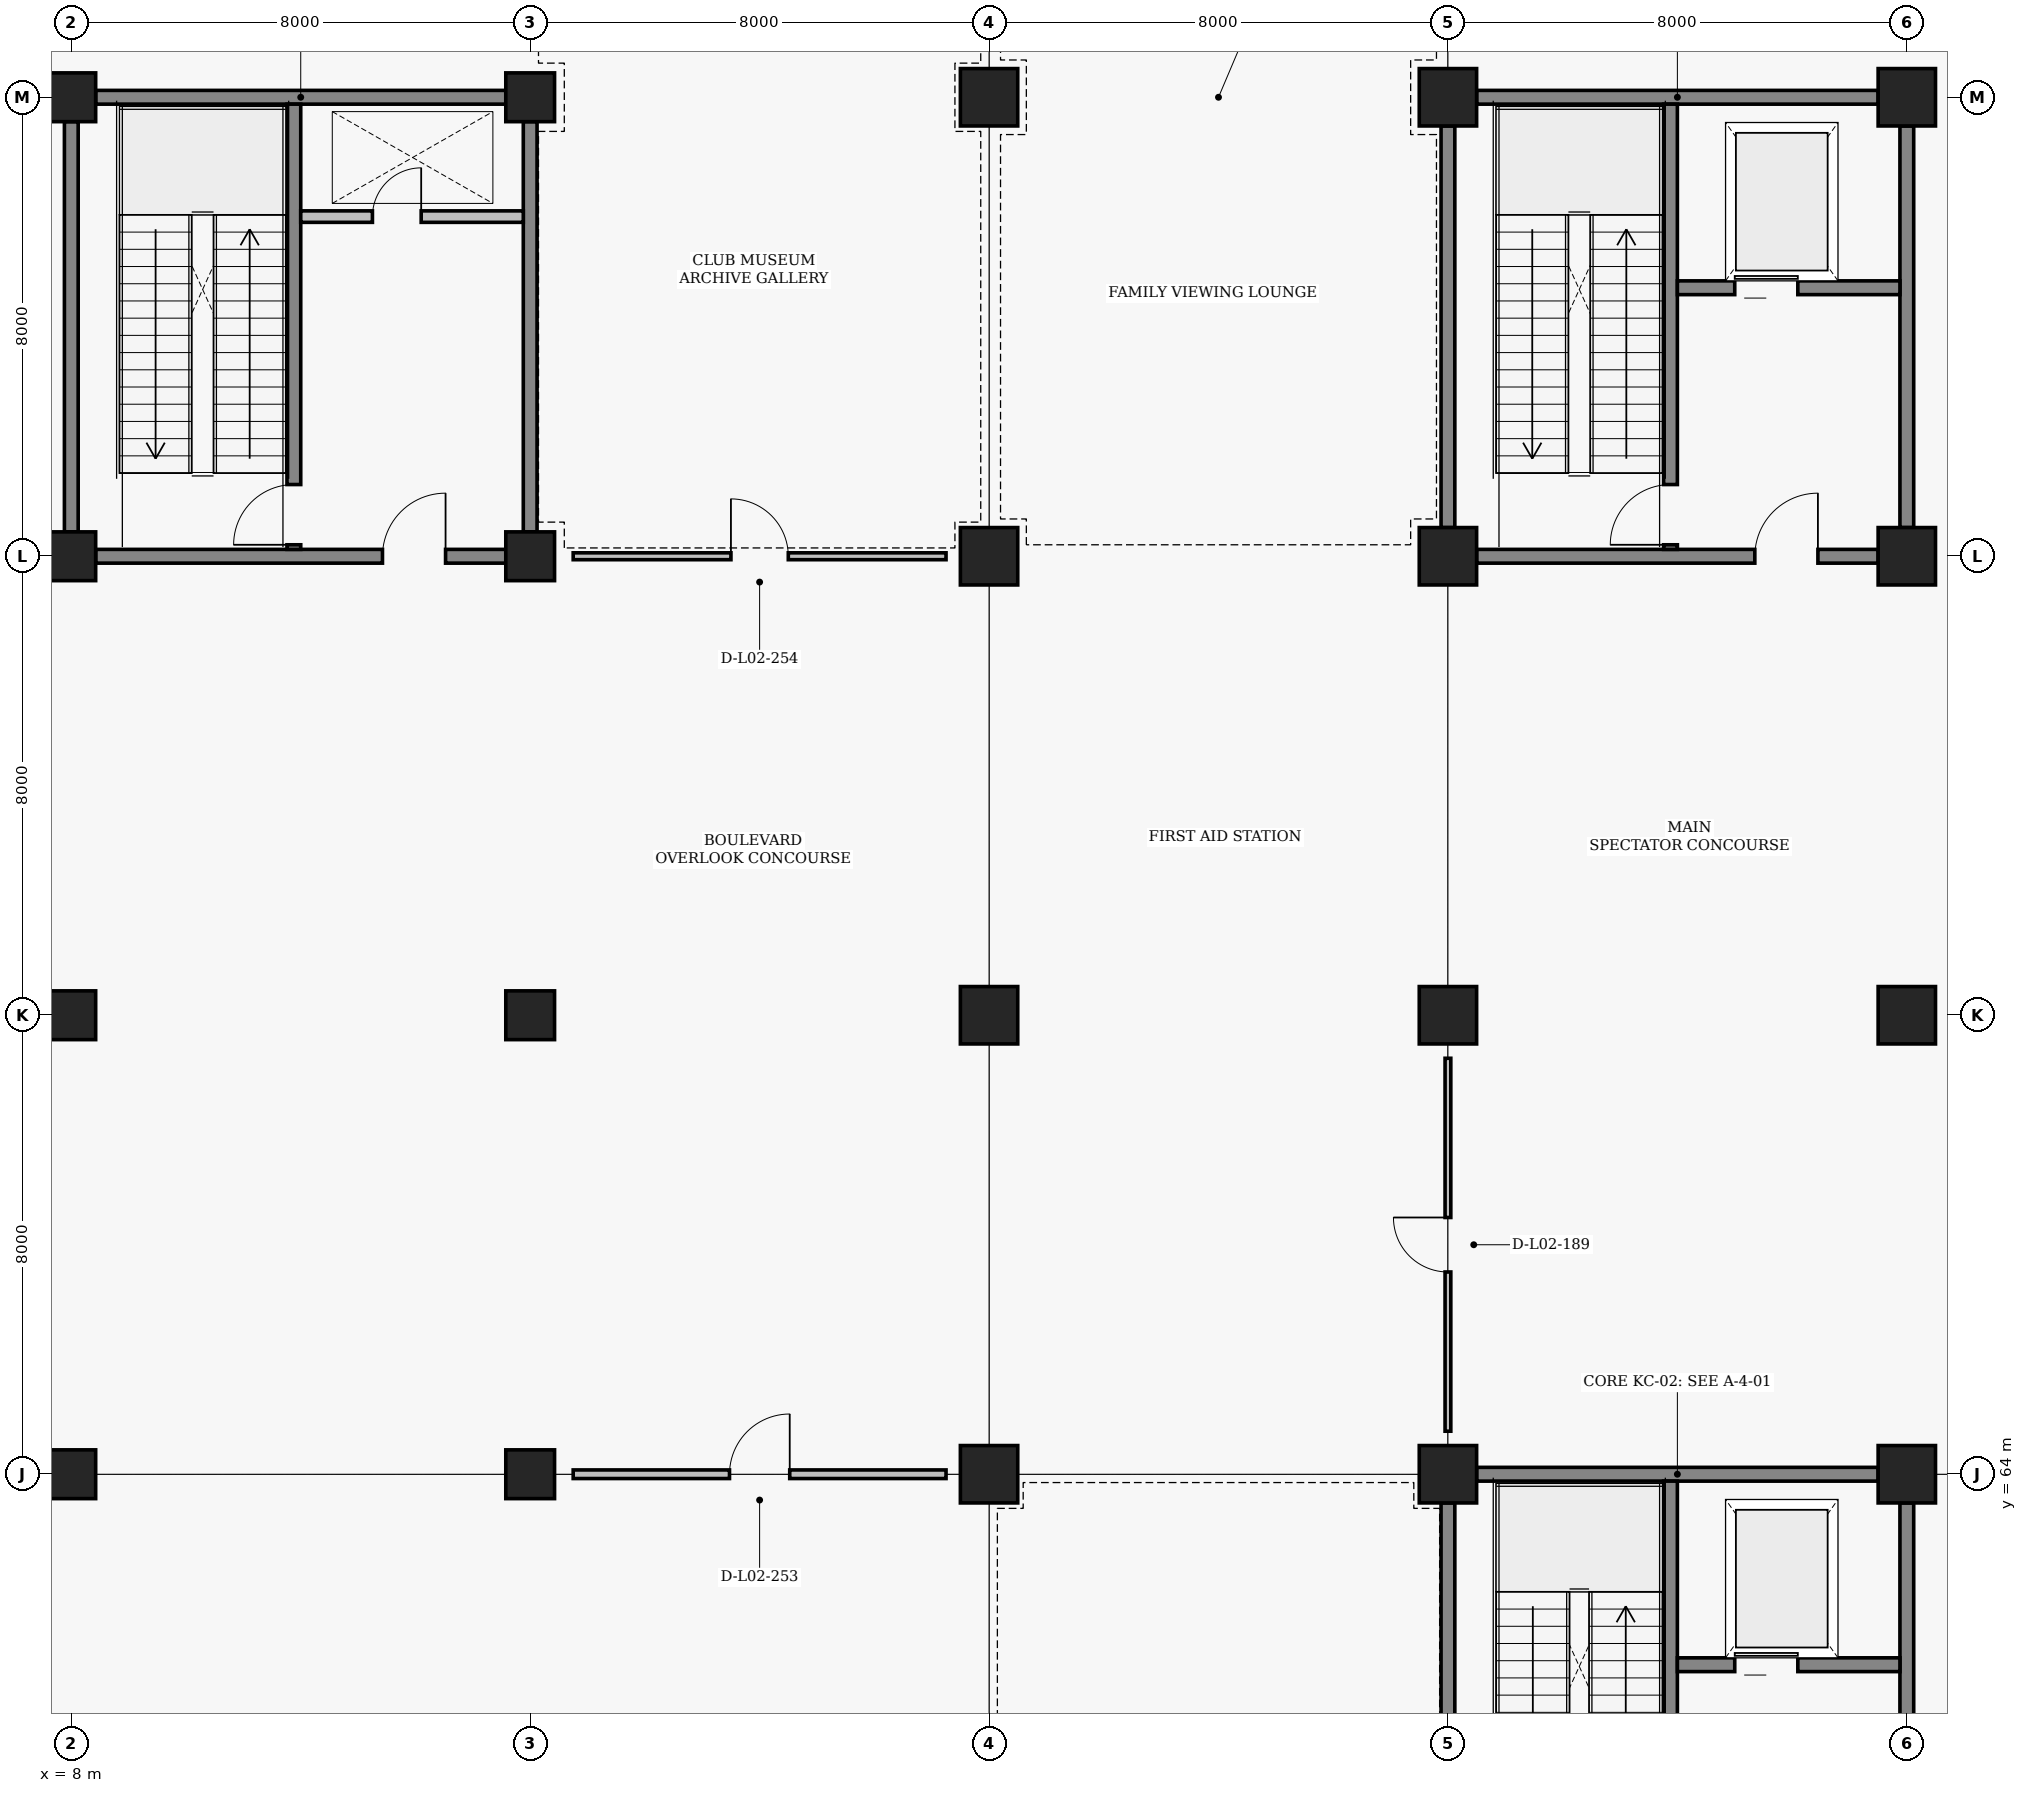
"""IFC4 building model, lengths in metres.
Left out: names, types, materials, properties, quantities, classifications, styles, units other than length and angle.
Written with IfcOpenShell. Run it as: python <this file> out.ifc"""

import sys

from ifc_helpers import new_model, si_unit, direction, frame, frame_2d, origin, origin_2d, place, context, subcontext, project, spatial, rectangle, circle, extrude, element, fill, save


model = new_model("IFC4")
c1 = context("Model", 3, precision=1e-05, world=origin(), true_north=direction((0.0, 1.0)))
c2 = subcontext(c1, "Body", "Model", "MODEL_VIEW")
j1 = project(units=[si_unit("LENGTHUNIT", "METRE"), si_unit("PLANEANGLEUNIT", "RADIAN")], contexts=[c1])
p1 = place(None, origin())
s1 = spatial("IfcSite", under=j1, at=p1, CompositionType="ELEMENT")
p2 = place(p1, origin())
s2 = spatial("IfcBuilding", under=s1, at=p2, CompositionType="ELEMENT")
p3 = place(p2, frame((0.0, 0.0, 4.8)))
s3 = spatial("IfcBuildingStorey", under=s2, at=p3, CompositionType="ELEMENT", Elevation=4.8)
for number, where, z_axis, x_axis in (
    (1, (8.0, 64.0, 0.0), (0.0, 0.0, 1.0), (1.0, 0.0, 0.0)),
    (2, (8.0, 72.0, 0.0), (0.0, 0.0, 1.0), (1.0, 0.0, 0.0)),
    (3, (8.0, 80.0, 0.0), (0.0, 0.0, 1.0), (1.0, 0.0, 0.0)),
    (4, (8.0, 88.0, 0.0), (0.0, 0.0, 1.0), (1.0, 0.0, 0.0)),
    (5, (16.0, 64.0, 0.0), (0.0, 0.0, 1.0), (1.0, 0.0, 0.0)),
    (6, (16.0, 72.0, 0.0), (0.0, 0.0, 1.0), (1.0, 0.0, 0.0)),
    (7, (16.0, 80.0, 0.0), (0.0, 0.0, 1.0), (1.0, 0.0, 0.0)),
    (8, (16.0, 88.0, 0.0), (0.0, 0.0, 1.0), (1.0, 0.0, 0.0)),
):
    element("IfcColumn", number, at=place(p3, frame(where, z_axis=z_axis, x_axis=x_axis)), inside=s3, PredefinedType="COLUMN", context=c2, shape_type="SweptSolid", body=[
        extrude(circle(Radius=0.425, at=origin_2d()), origin(), (0.0, 0.0, 1.0), 4.8),
    ])
for number, where, z_axis, x_axis in (
    (9, (24.0, 64.0, 0.0), (0.0, 0.0, 1.0), (1.0, 0.0, 0.0)),
    (10, (24.0, 72.0, 0.0), (0.0, 0.0, 1.0), (1.0, 0.0, 0.0)),
    (11, (24.0, 80.0, 0.0), (0.0, 0.0, 1.0), (1.0, 0.0, 0.0)),
    (12, (24.0, 88.0, 0.0), (0.0, 0.0, 1.0), (1.0, 0.0, 0.0)),
    (13, (32.0, 64.0, 0.0), (0.0, 0.0, 1.0), (1.0, 0.0, 0.0)),
    (14, (32.0, 72.0, 0.0), (0.0, 0.0, 1.0), (1.0, 0.0, 0.0)),
    (15, (32.0, 80.0, 0.0), (0.0, 0.0, 1.0), (1.0, 0.0, 0.0)),
    (16, (32.0, 88.0, 0.0), (0.0, 0.0, 1.0), (1.0, 0.0, 0.0)),
    (17, (40.0, 64.0, 0.0), (0.0, 0.0, 1.0), (1.0, 0.0, 0.0)),
    (18, (40.0, 72.0, 0.0), (0.0, 0.0, 1.0), (1.0, 0.0, 0.0)),
    (19, (40.0, 80.0, 0.0), (0.0, 0.0, 1.0), (1.0, 0.0, 0.0)),
    (20, (40.0, 88.0, 0.0), (0.0, 0.0, 1.0), (1.0, 0.0, 0.0)),
):
    element("IfcColumn", number, at=place(p3, frame(where, z_axis=z_axis, x_axis=x_axis)), inside=s3, PredefinedType="COLUMN", context=c2, shape_type="SweptSolid", body=[
        extrude(rectangle(XDim=1.0, YDim=1.0, at=origin_2d()), origin(), (0.0, 0.0, 1.0), 4.8),
    ])
for number, where, z_axis, x_axis in (
    (21, (32.5, 64.0, 0.0), (0.0, 0.0, 1.0), (1.0, 0.0, 0.0)),
    (22, (32.0, 56.5, 0.0), (0.0, 0.0, 1.0), (0.0, 1.0, 0.0)),
):
    element("IfcWall", number, at=place(p3, frame(where, z_axis=z_axis, x_axis=x_axis)), inside=s3, PredefinedType="SHEAR", context=c2, shape_type="SweptSolid", body=[
        extrude(rectangle(XDim=7.0, YDim=0.24, at=frame_2d((3.5, 0.0))), origin(), (0.0, 0.0, 1.0), 3.91),
    ])
p4 = place(p3, frame((40.0, 56.5, 0.0), z_axis=(0.0, 0.0, 1.0), x_axis=(0.0, 1.0, 0.0)))
e23 = element("IfcWall", 23, at=p4, inside=s3, PredefinedType="SHEAR", context=c2, shape_type="SweptSolid", body=[
    extrude(rectangle(XDim=7.0, YDim=0.24, at=frame_2d((3.5, 0.0))), origin(), (0.0, 0.0, 1.0), 3.61),
])
p5 = place(p3, frame((35.88, 56.12, 0.0), z_axis=(0.0, 0.0, 1.0), x_axis=(0.0, 1.0, 0.0)))
e24 = element("IfcWall", 24, at=p5, inside=s3, PredefinedType="SHEAR", context=c2, shape_type="SweptSolid", body=[
    extrude(rectangle(XDim=7.76, YDim=0.24, at=frame_2d((3.88, 0.0))), origin(), (0.0, 0.0, 1.0), 4.01),
])
p6 = place(p5, frame((0.08, 0.0, 0.0)))
e25 = element("IfcOpeningElement", 25, at=p6, cuts=e24, PredefinedType="OPENING", context=c2, shape_type="SweptSolid", body=[
    extrude(rectangle(XDim=1.05, YDim=2.15, at=frame_2d((0.525, 1.075))), frame((0.0, 0.13, 0.0), z_axis=(0.0, -1.0, 0.0), x_axis=(1.0, 0.0, 0.0)), (0.0, 0.0, 1.0), 0.26),
])
p7 = place(p3, frame((36.0, 60.68, 0.0), z_axis=(0.0, 0.0, 1.0), x_axis=(1.0, 0.0, 0.0)))
e26 = element("IfcWall", 26, at=p7, inside=s3, PredefinedType="SHEAR", context=c2, shape_type="SweptSolid", body=[
    extrude(rectangle(XDim=3.88, YDim=0.24, at=frame_2d((1.94, 0.0))), origin(), (0.0, 0.0, 1.0), 3.91),
])
p8 = place(p7, frame((1.0, 0.0, 0.0)))
e27 = element("IfcOpeningElement", 27, at=p8, cuts=e26, PredefinedType="OPENING", context=c2, shape_type="SweptSolid", body=[
    extrude(rectangle(XDim=1.1, YDim=2.15, at=frame_2d((0.55, 1.075))), frame((0.0, 0.13, 0.0), z_axis=(0.0, -1.0, 0.0), x_axis=(1.0, 0.0, 0.0)), (0.0, 0.0, 1.0), 0.26),
])
p9 = place(p3, frame((32.5, 80.0, 0.0), z_axis=(0.0, 0.0, 1.0), x_axis=(1.0, 0.0, 0.0)))
e28 = element("IfcWall", 28, at=p9, inside=s3, PredefinedType="SHEAR", context=c2, shape_type="SweptSolid", body=[
    extrude(rectangle(XDim=7.0, YDim=0.24, at=frame_2d((3.5, 0.0))), origin(), (0.0, 0.0, 1.0), 3.91),
])
p10 = place(p9, frame((4.85, 0.0, 0.0)))
e29 = element("IfcOpeningElement", 29, at=p10, cuts=e28, PredefinedType="OPENING", context=c2, shape_type="SweptSolid", body=[
    extrude(rectangle(XDim=1.1, YDim=2.2, at=frame_2d((0.55, 1.1))), frame((0.0, 0.13, 0.0), z_axis=(0.0, -1.0, 0.0), x_axis=(1.0, 0.0, 0.0)), (0.0, 0.0, 1.0), 0.26),
])
for number, where, z_axis, x_axis in (
    (30, (32.5, 88.0, 0.0), (0.0, 0.0, 1.0), (1.0, 0.0, 0.0)),
    (31, (32.0, 80.5, 0.0), (0.0, 0.0, 1.0), (0.0, 1.0, 0.0)),
    (32, (40.0, 80.5, 0.0), (0.0, 0.0, 1.0), (0.0, 1.0, 0.0)),
):
    element("IfcWall", number, at=place(p3, frame(where, z_axis=z_axis, x_axis=x_axis)), inside=s3, PredefinedType="SHEAR", context=c2, shape_type="SweptSolid", body=[
        extrude(rectangle(XDim=7.0, YDim=0.24, at=frame_2d((3.5, 0.0))), origin(), (0.0, 0.0, 1.0), 3.91),
    ])
p11 = place(p3, frame((35.88, 80.12, 0.0), z_axis=(0.0, 0.0, 1.0), x_axis=(0.0, 1.0, 0.0)))
e33 = element("IfcWall", 33, at=p11, inside=s3, PredefinedType="SHEAR", context=c2, shape_type="SweptSolid", body=[
    extrude(rectangle(XDim=7.76, YDim=0.24, at=frame_2d((3.88, 0.0))), origin(), (0.0, 0.0, 1.0), 4.01),
])
p12 = place(p11, frame((0.08, 0.0, 0.0)))
e34 = element("IfcOpeningElement", 34, at=p12, cuts=e33, PredefinedType="OPENING", context=c2, shape_type="SweptSolid", body=[
    extrude(rectangle(XDim=1.05, YDim=2.15, at=frame_2d((0.525, 1.075))), frame((0.0, 0.13, 0.0), z_axis=(0.0, -1.0, 0.0), x_axis=(1.0, 0.0, 0.0)), (0.0, 0.0, 1.0), 0.26),
])
p13 = place(p3, frame((36.0, 84.68, 0.0), z_axis=(0.0, 0.0, 1.0), x_axis=(1.0, 0.0, 0.0)))
e35 = element("IfcWall", 35, at=p13, inside=s3, PredefinedType="SHEAR", context=c2, shape_type="SweptSolid", body=[
    extrude(rectangle(XDim=3.88, YDim=0.24, at=frame_2d((1.94, 0.0))), origin(), (0.0, 0.0, 1.0), 3.91),
])
p14 = place(p13, frame((1.0, 0.0, 0.0)))
e36 = element("IfcOpeningElement", 36, at=p14, cuts=e35, PredefinedType="OPENING", context=c2, shape_type="SweptSolid", body=[
    extrude(rectangle(XDim=1.1, YDim=2.15, at=frame_2d((0.55, 1.075))), frame((0.0, 0.13, 0.0), z_axis=(0.0, -1.0, 0.0), x_axis=(1.0, 0.0, 0.0)), (0.0, 0.0, 1.0), 0.26),
])
p15 = place(p3, frame((8.425, 80.0, 0.0), z_axis=(0.0, 0.0, 1.0), x_axis=(1.0, 0.0, 0.0)))
e37 = element("IfcWall", 37, at=p15, inside=s3, PredefinedType="SHEAR", context=c2, shape_type="SweptSolid", body=[
    extrude(rectangle(XDim=7.15, YDim=0.24, at=frame_2d((3.575, 0.0))), origin(), (0.0, 0.0, 1.0), 3.61),
])
p16 = place(p15, frame((5.0, 0.0, 0.0)))
e38 = element("IfcOpeningElement", 38, at=p16, cuts=e37, PredefinedType="OPENING", context=c2, shape_type="SweptSolid", body=[
    extrude(rectangle(XDim=1.1, YDim=2.2, at=frame_2d((0.55, 1.1))), frame((0.0, 0.13, 0.0), z_axis=(0.0, -1.0, 0.0), x_axis=(1.0, 0.0, 0.0)), (0.0, 0.0, 1.0), 0.26),
])
for number, where, z_axis, x_axis in (
    (39, (8.425, 88.0, 0.0), (0.0, 0.0, 1.0), (1.0, 0.0, 0.0)),
    (40, (8.0, 80.425, 0.0), (0.0, 0.0, 1.0), (0.0, 1.0, 0.0)),
):
    element("IfcWall", number, at=place(p3, frame(where, z_axis=z_axis, x_axis=x_axis)), inside=s3, PredefinedType="SHEAR", context=c2, shape_type="SweptSolid", body=[
        extrude(rectangle(XDim=7.15, YDim=0.24, at=frame_2d((3.575, 0.0))), origin(), (0.0, 0.0, 1.0), 3.91),
    ])
p17 = place(p3, frame((16.0, 80.425, 0.0), z_axis=(0.0, 0.0, 1.0), x_axis=(0.0, 1.0, 0.0)))
e41 = element("IfcWall", 41, at=p17, inside=s3, PredefinedType="SHEAR", context=c2, shape_type="SweptSolid", body=[
    extrude(rectangle(XDim=7.15, YDim=0.24, at=frame_2d((3.575, 0.0))), origin(), (0.0, 0.0, 1.0), 3.61),
])
p18 = place(p3, frame((11.88, 80.12, 0.0), z_axis=(0.0, 0.0, 1.0), x_axis=(0.0, 1.0, 0.0)))
e42 = element("IfcWall", 42, at=p18, inside=s3, PredefinedType="SHEAR", context=c2, shape_type="SweptSolid", body=[
    extrude(rectangle(XDim=7.76, YDim=0.24, at=frame_2d((3.88, 0.0))), origin(), (0.0, 0.0, 1.0), 4.01),
])
p19 = place(p18, frame((0.08, 0.0, 0.0)))
e43 = element("IfcOpeningElement", 43, at=p19, cuts=e42, PredefinedType="OPENING", context=c2, shape_type="SweptSolid", body=[
    extrude(rectangle(XDim=1.05, YDim=2.15, at=frame_2d((0.525, 1.075))), frame((0.0, 0.13, 0.0), z_axis=(0.0, -1.0, 0.0), x_axis=(1.0, 0.0, 0.0)), (0.0, 0.0, 1.0), 0.26),
])
p20 = place(p3, frame((12.0, 85.92, 0.0), z_axis=(0.0, 0.0, 1.0), x_axis=(1.0, 0.0, 0.0)))
e44 = element("IfcWall", 44, at=p20, inside=s3, PredefinedType="PARTITIONING", context=c2, shape_type="SweptSolid", body=[
    extrude(rectangle(XDim=3.88, YDim=0.2, at=frame_2d((1.94, 0.0))), origin(), (0.0, 0.0, 1.0), 3.91),
])
p21 = place(p20, frame((1.25, 0.0, 0.0)))
e45 = element("IfcOpeningElement", 45, at=p21, cuts=e44, PredefinedType="OPENING", context=c2, shape_type="SweptSolid", body=[
    extrude(rectangle(XDim=0.85, YDim=2.05, at=frame_2d((0.425, 1.025))), frame((0.0, 0.11, 0.0), z_axis=(0.0, -1.0, 0.0), x_axis=(1.0, 0.0, 0.0)), (0.0, 0.0, 1.0), 0.22),
])
p22 = place(p3, frame((32.0, 64.75, 0.0), z_axis=(0.0, 0.0, 1.0), x_axis=(0.0, 1.0, 0.0)))
e46 = element("IfcWall", 46, at=p22, inside=s3, PredefinedType="PARTITIONING", context=c2, shape_type="SweptSolid", body=[
    extrude(rectangle(XDim=6.5, YDim=0.1, at=frame_2d((3.25, 0.0))), origin(), (0.0, 0.0, 1.0), 3.91),
])
p23 = place(p22, frame((2.775, 0.0, 0.0)))
e47 = element("IfcOpeningElement", 47, at=p23, cuts=e46, PredefinedType="OPENING", context=c2, shape_type="SweptSolid", body=[
    extrude(rectangle(XDim=0.95, YDim=2.1, at=frame_2d((0.475, 1.05))), frame((0.0, 0.06, 0.0), z_axis=(0.0, -1.0, 0.0), x_axis=(1.0, 0.0, 0.0)), (0.0, 0.0, 1.0), 0.12),
])
p24 = place(p3, frame((16.75, 64.0, 0.0), z_axis=(0.0, 0.0, 1.0), x_axis=(1.0, 0.0, 0.0)))
e48 = element("IfcWall", 48, at=p24, inside=s3, PredefinedType="PARTITIONING", context=c2, shape_type="SweptSolid", body=[
    extrude(rectangle(XDim=6.5, YDim=0.15, at=frame_2d((3.25, 0.0))), origin(), (0.0, 0.0, 1.0), 3.91),
])
p25 = place(p24, frame((2.725, 0.0, 0.0)))
e49 = element("IfcOpeningElement", 49, at=p25, cuts=e48, PredefinedType="OPENING", context=c2, shape_type="SweptSolid", body=[
    extrude(rectangle(XDim=1.05, YDim=2.15, at=frame_2d((0.525, 1.075))), frame((0.0, 0.085, 0.0), z_axis=(0.0, -1.0, 0.0), x_axis=(1.0, 0.0, 0.0)), (0.0, 0.0, 1.0), 0.17),
])
p26 = place(p3, frame((16.75, 80.0, 0.0), z_axis=(0.0, 0.0, 1.0), x_axis=(1.0, 0.0, 0.0)))
e50 = element("IfcWall", 50, at=p26, inside=s3, PredefinedType="PARTITIONING", context=c2, shape_type="SweptSolid", body=[
    extrude(rectangle(XDim=6.5, YDim=0.12, at=frame_2d((3.25, 0.0))), origin(), (0.0, 0.0, 1.0), 3.61),
])
p27 = place(p26, frame((2.75, 0.0, 0.0)))
e51 = element("IfcOpeningElement", 51, at=p27, cuts=e50, PredefinedType="OPENING", context=c2, shape_type="SweptSolid", body=[
    extrude(rectangle(XDim=1.0, YDim=2.1, at=frame_2d((0.5, 1.05))), frame((0.0, 0.07, 0.0), z_axis=(0.0, -1.0, 0.0), x_axis=(1.0, 0.0, 0.0)), (0.0, 0.0, 1.0), 0.14),
])
p28 = place(p8, origin())
e52 = element("IfcDoor", 52, at=p28, inside=s3, OperationType="SLIDING_TO_LEFT", PredefinedType="DOOR", context=c2, shape_type="SweptSolid", body=[
    extrude(rectangle(XDim=1.1, YDim=2.15, at=frame_2d((0.55, 1.075))), frame((0.0, 0.025, 0.0), z_axis=(0.0, -1.0, 0.0), x_axis=(1.0, 0.0, 0.0)), (0.0, 0.0, 1.0), 0.05),
])
fill(e27, e52)
p29 = place(p10, origin())
e53 = element("IfcDoor", 53, at=p29, inside=s3, OperationType="SINGLE_SWING_RIGHT", PredefinedType="DOOR", context=c2, shape_type="SweptSolid", body=[
    extrude(rectangle(XDim=1.1, YDim=2.2, at=frame_2d((0.55, 1.1))), frame((0.0, 0.025, 0.0), z_axis=(0.0, -1.0, 0.0), x_axis=(1.0, 0.0, 0.0)), (0.0, 0.0, 1.0), 0.05),
])
fill(e29, e53)
p30 = place(p12, origin())
e54 = element("IfcDoor", 54, at=p30, inside=s3, OperationType="SINGLE_SWING_LEFT", PredefinedType="DOOR", context=c2, shape_type="SweptSolid", body=[
    extrude(rectangle(XDim=1.05, YDim=2.15, at=frame_2d((0.525, 1.075))), frame((0.0, 0.025, 0.0), z_axis=(0.0, -1.0, 0.0), x_axis=(1.0, 0.0, 0.0)), (0.0, 0.0, 1.0), 0.05),
])
fill(e34, e54)
p31 = place(p14, origin())
e55 = element("IfcDoor", 55, at=p31, inside=s3, OperationType="SLIDING_TO_LEFT", PredefinedType="DOOR", context=c2, shape_type="SweptSolid", body=[
    extrude(rectangle(XDim=1.1, YDim=2.15, at=frame_2d((0.55, 1.075))), frame((0.0, 0.025, 0.0), z_axis=(0.0, -1.0, 0.0), x_axis=(1.0, 0.0, 0.0)), (0.0, 0.0, 1.0), 0.05),
])
fill(e36, e55)
p32 = place(p16, origin())
e56 = element("IfcDoor", 56, at=p32, inside=s3, OperationType="SINGLE_SWING_RIGHT", PredefinedType="DOOR", context=c2, shape_type="SweptSolid", body=[
    extrude(rectangle(XDim=1.1, YDim=2.2, at=frame_2d((0.55, 1.1))), frame((0.0, 0.025, 0.0), z_axis=(0.0, -1.0, 0.0), x_axis=(1.0, 0.0, 0.0)), (0.0, 0.0, 1.0), 0.05),
])
fill(e38, e56)
p33 = place(p19, origin())
e57 = element("IfcDoor", 57, at=p33, inside=s3, OperationType="SINGLE_SWING_LEFT", PredefinedType="DOOR", context=c2, shape_type="SweptSolid", body=[
    extrude(rectangle(XDim=1.05, YDim=2.15, at=frame_2d((0.525, 1.075))), frame((0.0, 0.025, 0.0), z_axis=(0.0, -1.0, 0.0), x_axis=(1.0, 0.0, 0.0)), (0.0, 0.0, 1.0), 0.05),
])
fill(e43, e57)
p34 = place(p21, origin())
e58 = element("IfcDoor", 58, at=p34, inside=s3, OperationType="SINGLE_SWING_RIGHT", PredefinedType="TRAPDOOR", context=c2, shape_type="SweptSolid", body=[
    extrude(rectangle(XDim=0.85, YDim=2.05, at=frame_2d((0.425, 1.025))), frame((0.0, 0.025, 0.0), z_axis=(0.0, -1.0, 0.0), x_axis=(1.0, 0.0, 0.0)), (0.0, 0.0, 1.0), 0.05),
])
fill(e45, e58)
p35 = place(p23, origin())
e59 = element("IfcDoor", 59, at=p35, inside=s3, OperationType="SINGLE_SWING_RIGHT", PredefinedType="DOOR", context=c2, shape_type="SweptSolid", body=[
    extrude(rectangle(XDim=0.95, YDim=2.1, at=frame_2d((0.475, 1.05))), frame((0.0, 0.025, 0.0), z_axis=(0.0, -1.0, 0.0), x_axis=(1.0, 0.0, 0.0)), (0.0, 0.0, 1.0), 0.05),
])
fill(e47, e59)
p36 = place(p25, origin())
e60 = element("IfcDoor", 60, at=p36, inside=s3, OperationType="SINGLE_SWING_RIGHT", PredefinedType="DOOR", context=c2, shape_type="SweptSolid", body=[
    extrude(rectangle(XDim=1.05, YDim=2.15, at=frame_2d((0.525, 1.075))), frame((0.0, 0.025, 0.0), z_axis=(0.0, -1.0, 0.0), x_axis=(1.0, 0.0, 0.0)), (0.0, 0.0, 1.0), 0.05),
])
fill(e49, e60)
p37 = place(p27, origin())
e61 = element("IfcDoor", 61, at=p37, inside=s3, OperationType="SINGLE_SWING_LEFT", PredefinedType="DOOR", context=c2, shape_type="SweptSolid", body=[
    extrude(rectangle(XDim=1.0, YDim=2.1, at=frame_2d((0.5, 1.05))), frame((0.0, 0.025, 0.0), z_axis=(0.0, -1.0, 0.0), x_axis=(1.0, 0.0, 0.0)), (0.0, 0.0, 1.0), 0.05),
])
fill(e51, e61)
save(model, sys.argv[1])
